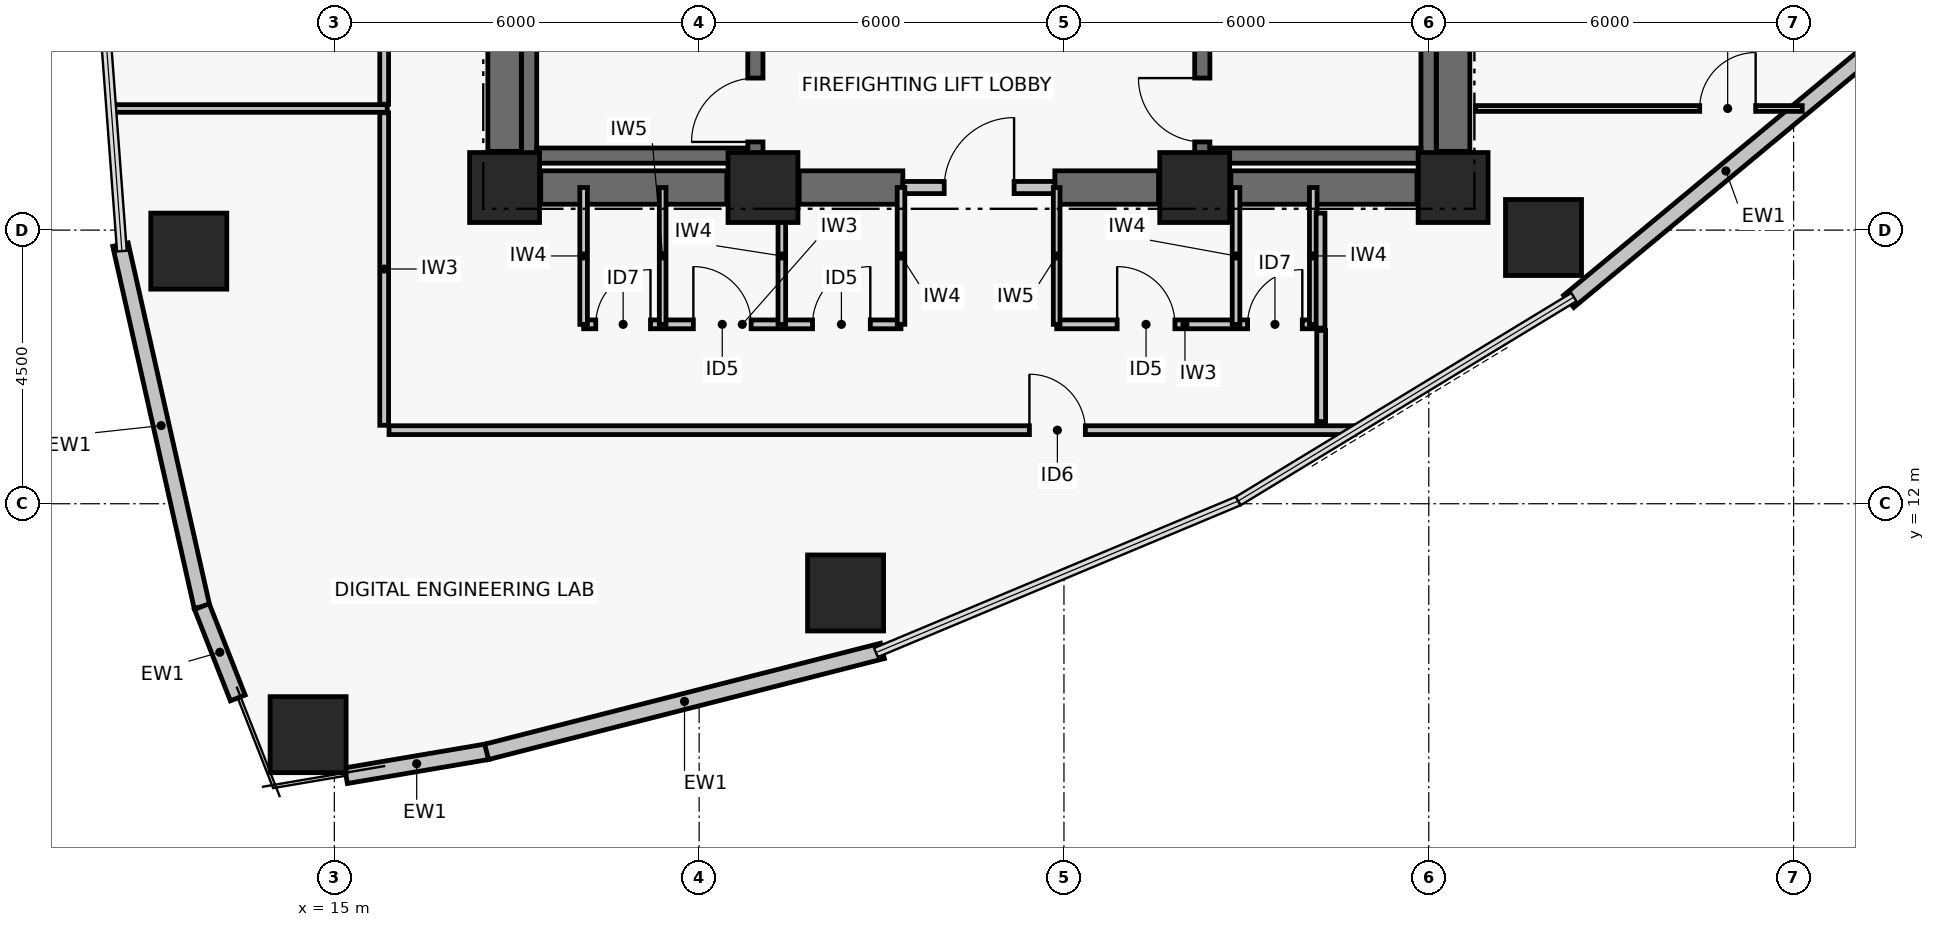
"""IFC4 building model, lengths in metres.
Left out: names, types, materials, properties, quantities, classifications, styles, units other than length and angle.
Written with IfcOpenShell. Run it as: python <this file> out.ifc"""

import sys

from ifc_helpers import new_model, si_unit, direction, frame, frame_2d, origin, origin_2d, place, context, subcontext, project, spatial, rectangle, hollow_rectangle, extrude, element, fill, save


model = new_model("IFC4")
c1 = context("Model", 3, precision=1e-05, world=origin(), true_north=direction((0.0, 1.0)))
c2 = subcontext(c1, "Body", "Model", "MODEL_VIEW")
j1 = project(units=[si_unit("LENGTHUNIT", "METRE"), si_unit("PLANEANGLEUNIT", "RADIAN")], contexts=[c1])
p1 = place(None, origin())
s1 = spatial("IfcSite", under=j1, at=p1, CompositionType="ELEMENT")
p2 = place(p1, origin())
s2 = spatial("IfcBuilding", under=s1, at=p2, CompositionType="ELEMENT")
p3 = place(p2, frame((0.0, 0.0, 92.82)))
s3 = spatial("IfcBuildingStorey", under=s2, at=p3, CompositionType="ELEMENT", Elevation=92.82)
for number, where, z_axis, x_axis in (
    (1, (17.8, 17.2, 0.0), (0.0, 0.0, 1.0), (1.0, 0.0, 0.0)),
    (2, (22.05, 17.2, 0.0), (0.0, 0.0, 1.0), (1.0, 0.0, 0.0)),
    (3, (29.15, 17.2, 0.0), (0.0, 0.0, 1.0), (1.0, 0.0, 0.0)),
    (4, (33.4, 17.2, 0.0), (0.0, 0.0, 1.0), (1.0, 0.0, 0.0)),
):
    element("IfcColumn", number, at=place(p3, frame(where, z_axis=z_axis, x_axis=x_axis)), inside=s3, PredefinedType="COLUMN", context=c2, shape_type="SweptSolid", body=[
        extrude(rectangle(XDim=1.15, YDim=1.15, at=origin_2d()), origin(), (0.0, 0.0, 1.0), 3.72),
    ])
p4 = place(p3, frame((18.395, 17.2, 0.0), z_axis=(0.0, 0.0, 1.0), x_axis=(1.0, 0.0, 0.0)))
e5 = element("IfcWall", 5, at=p4, inside=s3, PredefinedType="SHEAR", context=c2, shape_type="SweptSolid", body=[
    extrude(rectangle(XDim=3.06, YDim=0.55, at=frame_2d((1.53, 0.0))), origin(), (0.0, 0.0, 1.0), 3.47),
])
p5 = place(p3, frame((22.645, 17.2, 0.0), z_axis=(0.0, 0.0, 1.0), x_axis=(1.0, 0.0, 0.0)))
e6 = element("IfcWall", 6, at=p5, inside=s3, PredefinedType="SHEAR", context=c2, shape_type="SweptSolid", body=[
    extrude(rectangle(XDim=1.705, YDim=0.55, at=frame_2d((0.853, 0.0))), origin(), (0.0, 0.0, 1.0), 3.47),
])
p6 = place(p3, frame((26.85, 17.2, 0.0), z_axis=(0.0, 0.0, 1.0), x_axis=(1.0, 0.0, 0.0)))
e7 = element("IfcWall", 7, at=p6, inside=s3, PredefinedType="SHEAR", context=c2, shape_type="SweptSolid", body=[
    extrude(rectangle(XDim=1.705, YDim=0.55, at=frame_2d((0.853, 0.0))), origin(), (0.0, 0.0, 1.0), 3.47),
])
p7 = place(p3, frame((29.745, 17.2, 0.0), z_axis=(0.0, 0.0, 1.0), x_axis=(1.0, 0.0, 0.0)))
e8 = element("IfcWall", 8, at=p7, inside=s3, PredefinedType="SHEAR", context=c2, shape_type="SweptSolid", body=[
    extrude(rectangle(XDim=3.06, YDim=0.55, at=frame_2d((1.53, 0.0))), origin(), (0.0, 0.0, 1.0), 3.47),
])
for number, where, z_axis, x_axis in (
    (9, (17.8, 17.795, 0.0), (0.0, 0.0, 1.0), (0.0, 1.0, 0.0)),
    (10, (33.4, 17.795, 0.0), (0.0, 0.0, 1.0), (0.0, 1.0, 0.0)),
):
    element("IfcWall", number, at=place(p3, frame(where, z_axis=z_axis, x_axis=x_axis)), inside=s3, PredefinedType="SHEAR", context=c2, shape_type="SweptSolid", body=[
        extrude(rectangle(XDim=8.41, YDim=0.55, at=frame_2d((4.205, 0.0))), origin(), (0.0, 0.0, 1.0), 3.47),
    ])
p8 = place(p3, frame((18.204, 17.6, 0.0), z_axis=(0.0, 0.0, 1.0), x_axis=(0.0, 1.0, 0.0)))
e11 = element("IfcWall", 11, at=p8, inside=s3, PredefinedType="SHEAR", context=c2, shape_type="SweptSolid", body=[
    extrude(rectangle(XDim=8.8, YDim=0.25, at=frame_2d((4.4, 0.0))), origin(), (0.0, 0.0, 1.0), 3.47),
])
p9 = place(p3, frame((21.925, 17.6, 0.0), z_axis=(0.0, 0.0, 1.0), x_axis=(0.0, 1.0, 0.0)))
e12 = element("IfcWall", 12, at=p9, inside=s3, PredefinedType="SHEAR", context=c2, shape_type="SweptSolid", body=[
    extrude(rectangle(XDim=8.8, YDim=0.25, at=frame_2d((4.4, 0.0))), origin(), (0.0, 0.0, 1.0), 3.47),
])
p10 = place(p9, frame((0.35, 0.0, 0.0)))
e13 = element("IfcOpeningElement", 13, at=p10, cuts=e12, PredefinedType="OPENING", context=c2, shape_type="SweptSolid", body=[
    extrude(rectangle(XDim=1.05, YDim=2.08, at=frame_2d((0.525, 1.04))), frame((0.0, 0.135, 0.0), z_axis=(0.0, -1.0, 0.0), x_axis=(1.0, 0.0, 0.0)), (0.0, 0.0, 1.0), 0.27),
])
p11 = place(p3, frame((18.329, 17.725, 0.0), z_axis=(0.0, 0.0, 1.0), x_axis=(1.0, 0.0, 0.0)))
e14 = element("IfcWall", 14, at=p11, inside=s3, PredefinedType="SHEAR", context=c2, shape_type="SweptSolid", body=[
    extrude(rectangle(XDim=3.471, YDim=0.25, at=frame_2d((1.735, 0.0))), origin(), (0.0, 0.0, 1.0), 3.47),
])
p12 = place(p3, frame((29.275, 17.6, 0.0), z_axis=(0.0, 0.0, 1.0), x_axis=(0.0, 1.0, 0.0)))
e15 = element("IfcWall", 15, at=p12, inside=s3, PredefinedType="SHEAR", context=c2, shape_type="SweptSolid", body=[
    extrude(rectangle(XDim=8.8, YDim=0.25, at=frame_2d((4.4, 0.0))), origin(), (0.0, 0.0, 1.0), 3.47),
])
p13 = place(p12, frame((0.35, 0.0, 0.0)))
e16 = element("IfcOpeningElement", 16, at=p13, cuts=e15, PredefinedType="OPENING", context=c2, shape_type="SweptSolid", body=[
    extrude(rectangle(XDim=1.05, YDim=2.08, at=frame_2d((0.525, 1.04))), frame((0.0, 0.135, 0.0), z_axis=(0.0, -1.0, 0.0), x_axis=(1.0, 0.0, 0.0)), (0.0, 0.0, 1.0), 0.27),
])
p14 = place(p3, frame((32.996, 17.6, 0.0), z_axis=(0.0, 0.0, 1.0), x_axis=(0.0, 1.0, 0.0)))
e17 = element("IfcWall", 17, at=p14, inside=s3, PredefinedType="SHEAR", context=c2, shape_type="SweptSolid", body=[
    extrude(rectangle(XDim=8.8, YDim=0.25, at=frame_2d((4.4, 0.0))), origin(), (0.0, 0.0, 1.0), 3.47),
])
p15 = place(p3, frame((29.4, 17.725, 0.0), z_axis=(0.0, 0.0, 1.0), x_axis=(1.0, 0.0, 0.0)))
e18 = element("IfcWall", 18, at=p15, inside=s3, PredefinedType="SHEAR", context=c2, shape_type="SweptSolid", body=[
    extrude(rectangle(XDim=3.471, YDim=0.25, at=frame_2d((1.736, 0.0))), origin(), (0.0, 0.0, 1.0), 3.47),
])
for number, where, z_axis, x_axis in (
    (19, (12.607, 16.154, 0.0), (0.0, 0.0, 1.0), (1.0, 0.0, 0.0)),
    (20, (14.569, 8.203, 0.0), (0.0, 0.0, 1.0), (1.0, 0.0, 0.0)),
    (21, (23.408, 10.533, 0.0), (0.0, 0.0, 1.0), (1.0, 0.0, 0.0)),
    (22, (34.887, 16.378, 0.0), (0.0, 0.0, 1.0), (1.0, 0.0, 0.0)),
):
    element("IfcColumn", number, at=place(p3, frame(where, z_axis=z_axis, x_axis=x_axis)), inside=s3, PredefinedType="COLUMN", context=c2, shape_type="SweptSolid", body=[
        extrude(hollow_rectangle(XDim=1.25, YDim=1.25, WallThickness=0.05, at=origin_2d()), origin(), (0.0, 0.0, 1.0), 3.72),
    ])
p16 = place(p3, frame((12.822, 10.309, 0.0), z_axis=(0.0, 0.0, 1.0), x_axis=(-0.219535044336, 0.975604614743, 0.0)))
e23 = element("IfcWall", 23, at=p16, inside=s3, PredefinedType="PARTITIONING", context=c2, shape_type="SweptSolid", body=[
    extrude(rectangle(XDim=6.102, YDim=0.26, at=frame_2d((3.051, 0.0))), origin(), (0.0, 0.0, 1.0), 3.47),
])
p17 = place(p3, frame((13.412, 8.806, 0.0), z_axis=(0.0, 0.0, 1.0), x_axis=(-0.365488551504, 0.930815835018, 0.0)))
e24 = element("IfcWall", 24, at=p17, inside=s3, PredefinedType="PARTITIONING", context=c2, shape_type="SweptSolid", body=[
    extrude(rectangle(XDim=1.614, YDim=0.26, at=frame_2d((0.807, 0.0))), origin(), (0.0, 0.0, 1.0), 3.47),
])
p18 = place(p3, frame((17.516, 7.922, 0.0), z_axis=(0.0, 0.0, 1.0), x_axis=(-0.985905269947, -0.167304508875, 0.0)))
e25 = element("IfcWall", 25, at=p18, inside=s3, PredefinedType="PARTITIONING", context=c2, shape_type="SweptSolid", body=[
    extrude(rectangle(XDim=2.357, YDim=0.26, at=frame_2d((1.178, 0.0))), origin(), (0.0, 0.0, 1.0), 3.47),
])
p19 = place(p3, frame((24.014, 9.58, 0.0), z_axis=(0.0, 0.0, 1.0), x_axis=(-0.968981437296, -0.247133514876, 0.0)))
e26 = element("IfcWall", 26, at=p19, inside=s3, PredefinedType="PARTITIONING", context=c2, shape_type="SweptSolid", body=[
    extrude(rectangle(XDim=6.718, YDim=0.26, at=frame_2d((3.359, 0.0))), origin(), (0.0, 0.0, 1.0), 3.47),
])
p20 = place(p3, frame((40.472, 19.616, 0.0), z_axis=(0.0, 0.0, 1.0), x_axis=(-0.76975316947, -0.638341646841, 0.0)))
e27 = element("IfcWall", 27, at=p20, inside=s3, PredefinedType="PARTITIONING", context=c2, shape_type="SweptSolid", body=[
    extrude(rectangle(XDim=6.718, YDim=0.26, at=frame_2d((3.359, 0.0))), origin(), (0.0, 0.0, 1.0), 3.47),
])
p21 = place(p3, frame((24.35, 17.2, 0.0), z_axis=(0.0, 0.0, 1.0), x_axis=(1.0, 0.0, 0.0)))
e28 = element("IfcWall", 28, at=p21, inside=s3, PredefinedType="PARTITIONING", context=c2, shape_type="SweptSolid", body=[
    extrude(rectangle(XDim=2.5, YDim=0.2, at=frame_2d((1.25, 0.0))), origin(), (0.0, 0.0, 1.0), 2.6),
])
p22 = place(p21, frame((0.68, 0.0, 0.0)))
e29 = element("IfcOpeningElement", 29, at=p22, cuts=e28, PredefinedType="OPENING", context=c2, shape_type="SweptSolid", body=[
    extrude(rectangle(XDim=1.15, YDim=2.08, at=frame_2d((0.575, 1.04))), frame((0.0, 0.11, 0.0), z_axis=(0.0, -1.0, 0.0), x_axis=(1.0, 0.0, 0.0)), (0.0, 0.0, 1.0), 0.22),
])
p23 = place(p3, frame((19.1, 14.95, 0.0), z_axis=(0.0, 0.0, 1.0), x_axis=(1.0, 0.0, 0.0)))
e30 = element("IfcWall", 30, at=p23, inside=s3, PredefinedType="PARTITIONING", context=c2, shape_type="SweptSolid", body=[
    extrude(rectangle(XDim=5.22, YDim=0.145, at=frame_2d((2.61, 0.0))), origin(), (0.0, 0.0, 1.0), 2.65),
])
p24 = place(p23, frame((0.2, 0.0, 0.0)))
e31 = element("IfcOpeningElement", 31, at=p24, cuts=e30, PredefinedType="OPENING", context=c2, shape_type="SweptSolid", body=[
    extrude(rectangle(XDim=0.9, YDim=2.02, at=frame_2d((0.45, 1.01))), frame((0.0, 0.083, 0.0), z_axis=(0.0, -1.0, 0.0), x_axis=(1.0, 0.0, 0.0)), (0.0, 0.0, 1.0), 0.165),
])
p25 = place(p23, frame((1.805, 0.0, 0.0)))
e32 = element("IfcOpeningElement", 32, at=p25, cuts=e30, PredefinedType="OPENING", context=c2, shape_type="SweptSolid", body=[
    extrude(rectangle(XDim=0.95, YDim=2.06, at=frame_2d((0.475, 1.03))), frame((0.0, 0.083, 0.0), z_axis=(0.0, -1.0, 0.0), x_axis=(1.0, 0.0, 0.0)), (0.0, 0.0, 1.0), 0.165),
])
p26 = place(p23, frame((3.765, 0.0, 0.0)))
e33 = element("IfcOpeningElement", 33, at=p26, cuts=e30, PredefinedType="OPENING", context=c2, shape_type="SweptSolid", body=[
    extrude(rectangle(XDim=0.95, YDim=2.06, at=frame_2d((0.475, 1.03))), frame((0.0, 0.083, 0.0), z_axis=(0.0, -1.0, 0.0), x_axis=(1.0, 0.0, 0.0)), (0.0, 0.0, 1.0), 0.165),
])
p27 = place(p3, frame((26.88, 14.95, 0.0), z_axis=(0.0, 0.0, 1.0), x_axis=(1.0, 0.0, 0.0)))
e34 = element("IfcWall", 34, at=p27, inside=s3, PredefinedType="PARTITIONING", context=c2, shape_type="SweptSolid", body=[
    extrude(rectangle(XDim=4.22, YDim=0.145, at=frame_2d((2.11, 0.0))), origin(), (0.0, 0.0, 1.0), 3.05),
])
p28 = place(p27, frame((0.995, 0.0, 0.0)))
e35 = element("IfcOpeningElement", 35, at=p28, cuts=e34, PredefinedType="OPENING", context=c2, shape_type="SweptSolid", body=[
    extrude(rectangle(XDim=0.95, YDim=2.06, at=frame_2d((0.475, 1.03))), frame((0.0, 0.083, 0.0), z_axis=(0.0, -1.0, 0.0), x_axis=(1.0, 0.0, 0.0)), (0.0, 0.0, 1.0), 0.165),
])
p29 = place(p27, frame((3.14, 0.0, 0.0)))
e36 = element("IfcOpeningElement", 36, at=p29, cuts=e34, PredefinedType="OPENING", context=c2, shape_type="SweptSolid", body=[
    extrude(rectangle(XDim=0.9, YDim=2.02, at=frame_2d((0.45, 1.01))), frame((0.0, 0.083, 0.0), z_axis=(0.0, -1.0, 0.0), x_axis=(1.0, 0.0, 0.0)), (0.0, 0.0, 1.0), 0.165),
])
p30 = place(p3, frame((19.1, 14.95, 0.0), z_axis=(0.0, 0.0, 1.0), x_axis=(0.0, 1.0, 0.0)))
e37 = element("IfcWall", 37, at=p30, inside=s3, PredefinedType="PARTITIONING", context=c2, shape_type="SweptSolid", body=[
    extrude(rectangle(XDim=2.25, YDim=0.125, at=frame_2d((1.125, 0.0))), origin(), (0.0, 0.0, 1.0), 2.6),
])
p31 = place(p3, frame((20.4, 14.95, 0.0), z_axis=(0.0, 0.0, 1.0), x_axis=(0.0, 1.0, 0.0)))
e38 = element("IfcWall", 38, at=p31, inside=s3, PredefinedType="PARTITIONING", context=c2, shape_type="SweptSolid", body=[
    extrude(rectangle(XDim=2.25, YDim=0.11, at=frame_2d((1.125, 0.0))), origin(), (0.0, 0.0, 1.0), 2.6),
])
for number, where, z_axis, x_axis in (
    (39, (22.36, 14.95, 0.0), (0.0, 0.0, 1.0), (0.0, 1.0, 0.0)),
    (40, (24.32, 14.95, 0.0), (0.0, 0.0, 1.0), (0.0, 1.0, 0.0)),
):
    element("IfcWall", number, at=place(p3, frame(where, z_axis=z_axis, x_axis=x_axis)), inside=s3, PredefinedType="PARTITIONING", context=c2, shape_type="SweptSolid", body=[
        extrude(rectangle(XDim=2.25, YDim=0.125, at=frame_2d((1.125, 0.0))), origin(), (0.0, 0.0, 1.0), 2.6),
    ])
p32 = place(p3, frame((26.88, 14.95, 0.0), z_axis=(0.0, 0.0, 1.0), x_axis=(0.0, 1.0, 0.0)))
e41 = element("IfcWall", 41, at=p32, inside=s3, PredefinedType="PARTITIONING", context=c2, shape_type="SweptSolid", body=[
    extrude(rectangle(XDim=2.25, YDim=0.11, at=frame_2d((1.125, 0.0))), origin(), (0.0, 0.0, 1.0), 2.6),
])
for number, where, z_axis, x_axis in (
    (42, (29.83, 14.95, 0.0), (0.0, 0.0, 1.0), (0.0, 1.0, 0.0)),
    (43, (31.1, 14.95, 0.0), (0.0, 0.0, 1.0), (0.0, 1.0, 0.0)),
):
    element("IfcWall", number, at=place(p3, frame(where, z_axis=z_axis, x_axis=x_axis)), inside=s3, PredefinedType="PARTITIONING", context=c2, shape_type="SweptSolid", body=[
        extrude(rectangle(XDim=2.25, YDim=0.125, at=frame_2d((1.125, 0.0))), origin(), (0.0, 0.0, 1.0), 2.6),
    ])
p33 = place(p3, frame((15.82, 18.43, 0.0), z_axis=(0.0, 0.0, 1.0), x_axis=(0.0, -1.0, 0.0)))
e44 = element("IfcWall", 44, at=p33, inside=s3, PredefinedType="PARTITIONING", context=c2, shape_type="SweptSolid", body=[
    extrude(rectangle(XDim=5.14, YDim=0.145, at=frame_2d((2.57, 0.0))), origin(), (0.0, 0.0, 1.0), 2.65),
])
p34 = place(p3, frame((15.9, 13.21, 0.0), z_axis=(0.0, 0.0, 1.0), x_axis=(1.0, 0.0, 0.0)))
e45 = element("IfcWall", 45, at=p34, inside=s3, PredefinedType="PARTITIONING", context=c2, shape_type="SweptSolid", body=[
    extrude(rectangle(XDim=15.884, YDim=0.145, at=frame_2d((7.942, 0.0))), origin(), (0.0, 0.0, 1.0), 2.65),
])
p35 = place(p34, frame((10.532, 0.0, 0.0)))
e46 = element("IfcOpeningElement", 46, at=p35, cuts=e45, PredefinedType="OPENING", context=c2, shape_type="SweptSolid", body=[
    extrude(rectangle(XDim=0.92, YDim=2.05, at=frame_2d((0.46, 1.025))), frame((0.0, 0.083, 0.0), z_axis=(0.0, -1.0, 0.0), x_axis=(1.0, 0.0, 0.0)), (0.0, 0.0, 1.0), 0.165),
])
p36 = place(p3, frame((31.23, 13.351, 0.0), z_axis=(0.0, 0.0, 1.0), x_axis=(0.0, 1.0, 0.0)))
e47 = element("IfcWall", 47, at=p36, inside=s3, PredefinedType="PARTITIONING", context=c2, shape_type="SweptSolid", body=[
    extrude(rectangle(XDim=1.499, YDim=0.145, at=frame_2d((0.75, 0.0))), origin(), (0.0, 0.0, 1.0), 2.85),
])
p37 = place(p3, frame((31.22, 14.889, 0.0), z_axis=(0.0, 0.0, 1.0), x_axis=(0.0, 1.0, 0.0)))
e48 = element("IfcWall", 48, at=p37, inside=s3, PredefinedType="PARTITIONING", context=c2, shape_type="SweptSolid", body=[
    extrude(rectangle(XDim=1.891, YDim=0.145, at=frame_2d((0.946, 0.0))), origin(), (0.0, 0.0, 1.0), 2.6),
])
p38 = place(p3, frame((15.82, 25.43, 0.0), z_axis=(0.0, 0.0, 1.0), x_axis=(0.0, -1.0, 0.0)))
e49 = element("IfcWall", 49, at=p38, inside=s3, PredefinedType="PARTITIONING", context=c2, shape_type="SweptSolid", body=[
    extrude(rectangle(XDim=6.86, YDim=0.145, at=frame_2d((3.43, 0.0))), origin(), (0.0, 0.0, 1.0), 3.05),
])
p39 = place(p38, frame((2.955, 0.0, 0.0)))
e50 = element("IfcOpeningElement", 50, at=p39, cuts=e49, PredefinedType="OPENING", context=c2, shape_type="SweptSolid", body=[
    extrude(rectangle(XDim=0.95, YDim=2.06, at=frame_2d((0.475, 1.03))), frame((0.0, 0.083, 0.0), z_axis=(0.0, -1.0, 0.0), x_axis=(1.0, 0.0, 0.0)), (0.0, 0.0, 1.0), 0.165),
])
p40 = place(p3, frame((11.321, 18.5, 0.0), z_axis=(0.0, 0.0, 1.0), x_axis=(1.0, 0.0, 0.0)))
e51 = element("IfcWall", 51, at=p40, inside=s3, PredefinedType="PARTITIONING", context=c2, shape_type="SweptSolid", body=[
    extrude(rectangle(XDim=4.549, YDim=0.125, at=frame_2d((2.275, 0.0))), origin(), (0.0, 0.0, 1.0), 2.85),
])
p41 = place(p3, frame((33.77, 18.5, 0.0), z_axis=(0.0, 0.0, 1.0), x_axis=(1.0, 0.0, 0.0)))
e52 = element("IfcWall", 52, at=p41, inside=s3, PredefinedType="PARTITIONING", context=c2, shape_type="SweptSolid", body=[
    extrude(rectangle(XDim=5.372, YDim=0.095, at=frame_2d((2.686, 0.0))), origin(), (0.0, 0.0, 1.0), 2.6),
])
p42 = place(p41, frame((3.686, 0.0, 0.0)))
e53 = element("IfcOpeningElement", 53, at=p42, cuts=e52, PredefinedType="OPENING", context=c2, shape_type="SweptSolid", body=[
    extrude(rectangle(XDim=0.92, YDim=2.05, at=frame_2d((0.46, 1.025))), frame((0.0, 0.057, 0.0), z_axis=(0.0, -1.0, 0.0), x_axis=(1.0, 0.0, 0.0)), (0.0, 0.0, 1.0), 0.115),
])
p43 = place(p10, origin())
e54 = element("IfcDoor", 54, at=p43, inside=s3, OperationType="SINGLE_SWING_LEFT", PredefinedType="DOOR", context=c2, shape_type="SweptSolid", body=[
    extrude(rectangle(XDim=1.05, YDim=2.08, at=frame_2d((0.525, 1.04))), frame((0.0, 0.025, 0.0), z_axis=(0.0, -1.0, 0.0), x_axis=(1.0, 0.0, 0.0)), (0.0, 0.0, 1.0), 0.05),
])
fill(e13, e54)
p44 = place(p13, origin())
e55 = element("IfcDoor", 55, at=p44, inside=s3, OperationType="SINGLE_SWING_RIGHT", PredefinedType="DOOR", context=c2, shape_type="SweptSolid", body=[
    extrude(rectangle(XDim=1.05, YDim=2.08, at=frame_2d((0.525, 1.04))), frame((0.0, 0.025, 0.0), z_axis=(0.0, -1.0, 0.0), x_axis=(1.0, 0.0, 0.0)), (0.0, 0.0, 1.0), 0.05),
])
fill(e16, e55)
p45 = place(p22, origin())
e56 = element("IfcDoor", 56, at=p45, inside=s3, OperationType="SINGLE_SWING_RIGHT", PredefinedType="DOOR", context=c2, shape_type="SweptSolid", body=[
    extrude(rectangle(XDim=1.15, YDim=2.08, at=frame_2d((0.575, 1.04))), frame((0.0, 0.025, 0.0), z_axis=(0.0, -1.0, 0.0), x_axis=(1.0, 0.0, 0.0)), (0.0, 0.0, 1.0), 0.05),
])
fill(e29, e56)
p46 = place(p24, origin())
e57 = element("IfcDoor", 57, at=p46, inside=s3, OperationType="SINGLE_SWING_RIGHT", PredefinedType="DOOR", context=c2, shape_type="SweptSolid", body=[
    extrude(rectangle(XDim=0.9, YDim=2.02, at=frame_2d((0.45, 1.01))), frame((0.0, 0.025, 0.0), z_axis=(0.0, -1.0, 0.0), x_axis=(1.0, 0.0, 0.0)), (0.0, 0.0, 1.0), 0.05),
])
fill(e31, e57)
p47 = place(p25, origin())
e58 = element("IfcDoor", 58, at=p47, inside=s3, OperationType="SINGLE_SWING_LEFT", PredefinedType="DOOR", context=c2, shape_type="SweptSolid", body=[
    extrude(rectangle(XDim=0.95, YDim=2.06, at=frame_2d((0.475, 1.03))), frame((0.0, 0.025, 0.0), z_axis=(0.0, -1.0, 0.0), x_axis=(1.0, 0.0, 0.0)), (0.0, 0.0, 1.0), 0.05),
])
fill(e32, e58)
p48 = place(p26, origin())
e59 = element("IfcDoor", 59, at=p48, inside=s3, OperationType="SINGLE_SWING_RIGHT", PredefinedType="DOOR", context=c2, shape_type="SweptSolid", body=[
    extrude(rectangle(XDim=0.95, YDim=2.06, at=frame_2d((0.475, 1.03))), frame((0.0, 0.025, 0.0), z_axis=(0.0, -1.0, 0.0), x_axis=(1.0, 0.0, 0.0)), (0.0, 0.0, 1.0), 0.05),
])
fill(e33, e59)
p49 = place(p28, origin())
e60 = element("IfcDoor", 60, at=p49, inside=s3, OperationType="SINGLE_SWING_LEFT", PredefinedType="DOOR", context=c2, shape_type="SweptSolid", body=[
    extrude(rectangle(XDim=0.95, YDim=2.06, at=frame_2d((0.475, 1.03))), frame((0.0, 0.025, 0.0), z_axis=(0.0, -1.0, 0.0), x_axis=(1.0, 0.0, 0.0)), (0.0, 0.0, 1.0), 0.05),
])
fill(e35, e60)
p50 = place(p29, origin())
e61 = element("IfcDoor", 61, at=p50, inside=s3, OperationType="SINGLE_SWING_RIGHT", PredefinedType="DOOR", context=c2, shape_type="SweptSolid", body=[
    extrude(rectangle(XDim=0.9, YDim=2.02, at=frame_2d((0.45, 1.01))), frame((0.0, 0.025, 0.0), z_axis=(0.0, -1.0, 0.0), x_axis=(1.0, 0.0, 0.0)), (0.0, 0.0, 1.0), 0.05),
])
fill(e36, e61)
p51 = place(p35, origin())
e62 = element("IfcDoor", 62, at=p51, inside=s3, OperationType="SINGLE_SWING_LEFT", PredefinedType="DOOR", context=c2, shape_type="SweptSolid", body=[
    extrude(rectangle(XDim=0.92, YDim=2.05, at=frame_2d((0.46, 1.025))), frame((0.0, 0.025, 0.0), z_axis=(0.0, -1.0, 0.0), x_axis=(1.0, 0.0, 0.0)), (0.0, 0.0, 1.0), 0.05),
])
fill(e46, e62)
p52 = place(p42, origin())
e63 = element("IfcDoor", 63, at=p52, inside=s3, OperationType="SINGLE_SWING_RIGHT", PredefinedType="DOOR", context=c2, shape_type="SweptSolid", body=[
    extrude(rectangle(XDim=0.92, YDim=2.05, at=frame_2d((0.46, 1.025))), frame((0.0, 0.025, 0.0), z_axis=(0.0, -1.0, 0.0), x_axis=(1.0, 0.0, 0.0)), (0.0, 0.0, 1.0), 0.05),
])
fill(e53, e63)
save(model, sys.argv[1])
